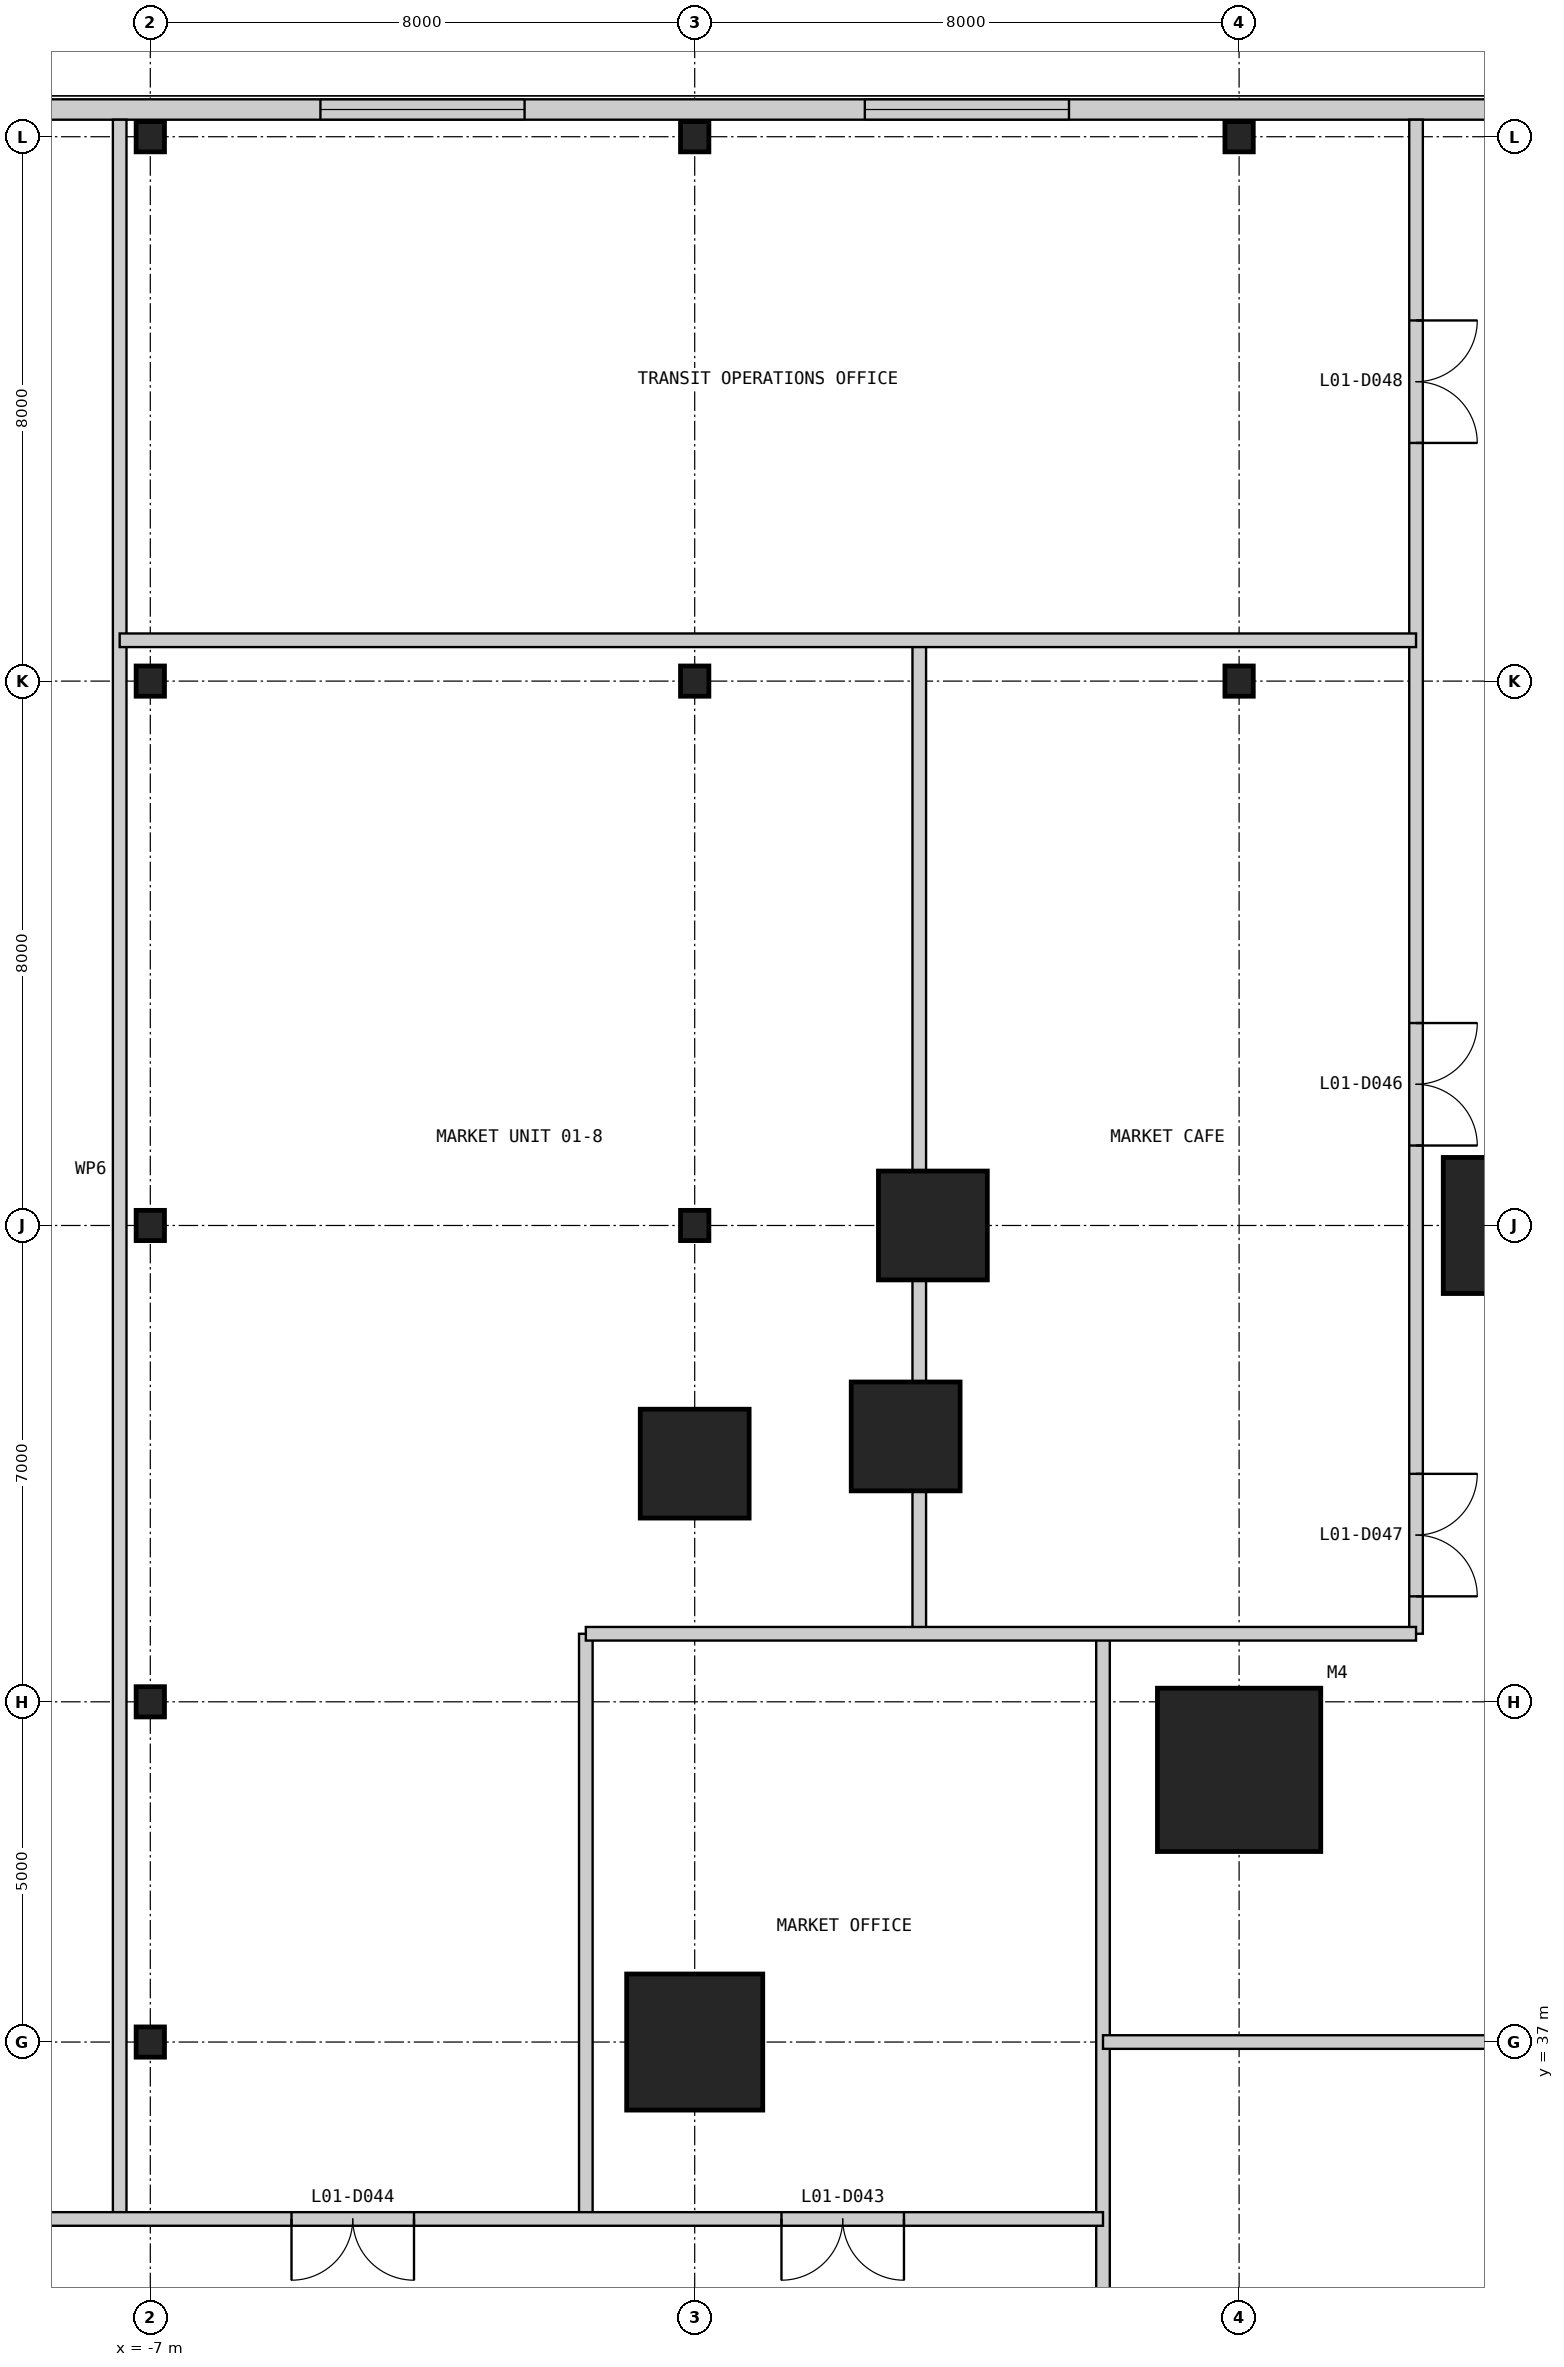
"""IFC4 building model, lengths in metres.
Left out: names, types, materials, properties, quantities, classifications, styles, units other than length and angle.
Written with IfcOpenShell. Run it as: python <this file> out.ifc"""

import sys

from ifc_helpers import new_model, si_unit, direction, frame, frame_2d, origin, origin_2d, place, context, subcontext, project, spatial, rectangle, i_section, extrude, element, fill, save


model = new_model("IFC4")
c1 = context("Model", 3, precision=1e-05, world=origin(), true_north=direction((0.0, 1.0)))
c2 = subcontext(c1, "Body", "Model", "MODEL_VIEW")
j1 = project(units=[si_unit("LENGTHUNIT", "METRE"), si_unit("PLANEANGLEUNIT", "RADIAN")], contexts=[c1])
p1 = place(None, origin())
s1 = spatial("IfcSite", under=j1, at=p1, CompositionType="ELEMENT")
p2 = place(p1, origin())
s2 = spatial("IfcBuilding", under=s1, at=p2, CompositionType="ELEMENT")
p3 = place(p2, frame((0.0, 0.0, 7.0)))
s3 = spatial("IfcBuildingStorey", under=s2, at=p3, CompositionType="ELEMENT", Elevation=7.0)
p4 = place(p3, frame((9.0, 41.0, 0.0), z_axis=(0.0, 0.0, 1.0), x_axis=(1.0, 0.0, 0.0)))
e1 = element("IfcColumn", 1, at=p4, inside=s3, PredefinedType="COLUMN", context=c2, shape_type="SweptSolid", body=[
    extrude(rectangle(XDim=2.4, YDim=2.4, at=origin_2d()), origin(), (0.0, 0.0, 1.0), 4.8),
])
p5 = place(p3, frame((13.0, 49.0, 0.0), z_axis=(0.0, 0.0, 1.0), x_axis=(1.0, 0.0, 0.0)))
e2 = element("IfcColumn", 2, at=p5, inside=s3, PredefinedType="COLUMN", context=c2, shape_type="SweptSolid", body=[
    extrude(rectangle(XDim=2.0, YDim=2.0, at=origin_2d()), origin(), (0.0, 0.0, 1.0), 4.8),
])
for number, where, z_axis, x_axis in (
    (3, (4.5, 49.0, 0.0), (0.0, 0.0, 1.0), (1.0, 0.0, 0.0)),
    (4, (4.1, 45.9, 0.0), (0.0, 0.0, 1.0), (1.0, 0.0, 0.0)),
    (5, (1.0, 45.5, 0.0), (0.0, 0.0, 1.0), (1.0, 0.0, 0.0)),
):
    element("IfcColumn", number, at=place(p3, frame(where, z_axis=z_axis, x_axis=x_axis)), inside=s3, PredefinedType="COLUMN", context=c2, shape_type="SweptSolid", body=[
        extrude(rectangle(XDim=1.6, YDim=1.6, at=origin_2d()), origin(), (0.0, 0.0, 1.0), 4.8),
    ])
p6 = place(p3, frame((1.0, 37.0, 0.0), z_axis=(0.0, 0.0, 1.0), x_axis=(1.0, 0.0, 0.0)))
e6 = element("IfcColumn", 6, at=p6, inside=s3, PredefinedType="COLUMN", context=c2, shape_type="SweptSolid", body=[
    extrude(rectangle(XDim=2.0, YDim=2.0, at=origin_2d()), origin(), (0.0, 0.0, 1.0), 4.8),
])
for number, where, z_axis, x_axis in (
    (7, (-7.0, 37.0, 0.0), (0.0, 0.0, 1.0), (1.0, 0.0, 0.0)),
    (8, (-7.0, 42.0, 0.0), (0.0, 0.0, 1.0), (1.0, 0.0, 0.0)),
    (9, (-7.0, 49.0, 0.0), (0.0, 0.0, 1.0), (1.0, 0.0, 0.0)),
    (10, (-7.0, 57.0, 0.0), (0.0, 0.0, 1.0), (1.0, 0.0, 0.0)),
    (11, (-7.0, 65.0, 0.0), (0.0, 0.0, 1.0), (1.0, 0.0, 0.0)),
    (12, (1.0, 49.0, 0.0), (0.0, 0.0, 1.0), (1.0, 0.0, 0.0)),
    (13, (1.0, 57.0, 0.0), (0.0, 0.0, 1.0), (1.0, 0.0, 0.0)),
    (14, (1.0, 65.0, 0.0), (0.0, 0.0, 1.0), (1.0, 0.0, 0.0)),
    (15, (9.0, 57.0, 0.0), (0.0, 0.0, 1.0), (1.0, 0.0, 0.0)),
    (16, (9.0, 65.0, 0.0), (0.0, 0.0, 1.0), (1.0, 0.0, 0.0)),
):
    element("IfcColumn", number, at=place(p3, frame(where, z_axis=z_axis, x_axis=x_axis)), inside=s3, PredefinedType="COLUMN", context=c2, shape_type="SweptSolid", body=[
        extrude(i_section(OverallWidth=0.417, OverallDepth=0.445, WebThickness=0.039, FlangeThickness=0.063, at=origin_2d()), origin(), (0.0, 0.0, 1.0), 4.8),
    ])
p7 = place(p3, frame((65.55, 65.4, 0.0), z_axis=(0.0, 0.0, 1.0), x_axis=(-1.0, 0.0, 0.0)))
e17 = element("IfcWall", 17, at=p7, inside=s3, PredefinedType="SOLIDWALL", context=c2, shape_type="SweptSolid", body=[
    extrude(rectangle(XDim=81.1, YDim=0.3, at=frame_2d((40.55, 0.0))), origin(), (0.0, 0.0, 1.0), 4.5),
])
p8 = place(p7, frame((75.05, 0.0, 0.9)))
e18 = element("IfcOpeningElement", 18, at=p8, cuts=e17, PredefinedType="OPENING", context=c2, shape_type="SweptSolid", body=[
    extrude(rectangle(XDim=3.0, YDim=2.4, at=frame_2d((1.5, 1.2))), frame((0.0, 0.16, 0.0), z_axis=(0.0, -1.0, 0.0), x_axis=(1.0, 0.0, 0.0)), (0.0, 0.0, 1.0), 0.32),
])
p9 = place(p7, frame((67.05, 0.0, 0.9)))
e19 = element("IfcOpeningElement", 19, at=p9, cuts=e17, PredefinedType="OPENING", context=c2, shape_type="SweptSolid", body=[
    extrude(rectangle(XDim=3.0, YDim=2.4, at=frame_2d((1.5, 1.2))), frame((0.0, 0.16, 0.0), z_axis=(0.0, -1.0, 0.0), x_axis=(1.0, 0.0, 0.0)), (0.0, 0.0, 1.0), 0.32),
])
p10 = place(p7, frame((59.05, 0.0, 0.9)))
e20 = element("IfcOpeningElement", 20, at=p10, cuts=e17, PredefinedType="OPENING", context=c2, shape_type="SweptSolid", body=[
    extrude(rectangle(XDim=3.0, YDim=2.4, at=frame_2d((1.5, 1.2))), frame((0.0, 0.16, 0.0), z_axis=(0.0, -1.0, 0.0), x_axis=(1.0, 0.0, 0.0)), (0.0, 0.0, 1.0), 0.32),
])
p11 = place(p7, frame((45.05, 0.0, 0.9)))
e21 = element("IfcOpeningElement", 21, at=p11, cuts=e17, PredefinedType="OPENING", context=c2, shape_type="SweptSolid", body=[
    extrude(rectangle(XDim=3.0, YDim=2.4, at=frame_2d((1.5, 1.2))), frame((0.0, 0.16, 0.0), z_axis=(0.0, -1.0, 0.0), x_axis=(1.0, 0.0, 0.0)), (0.0, 0.0, 1.0), 0.32),
])
p12 = place(p7, frame((33.05, 0.0, 0.9)))
e22 = element("IfcOpeningElement", 22, at=p12, cuts=e17, PredefinedType="OPENING", context=c2, shape_type="SweptSolid", body=[
    extrude(rectangle(XDim=3.0, YDim=2.4, at=frame_2d((1.5, 1.2))), frame((0.0, 0.16, 0.0), z_axis=(0.0, -1.0, 0.0), x_axis=(1.0, 0.0, 0.0)), (0.0, 0.0, 1.0), 0.32),
])
p13 = place(p7, frame((24.55, 0.0, 0.9)))
e23 = element("IfcOpeningElement", 23, at=p13, cuts=e17, PredefinedType="OPENING", context=c2, shape_type="SweptSolid", body=[
    extrude(rectangle(XDim=3.0, YDim=2.4, at=frame_2d((1.5, 1.2))), frame((0.0, 0.16, 0.0), z_axis=(0.0, -1.0, 0.0), x_axis=(1.0, 0.0, 0.0)), (0.0, 0.0, 1.0), 0.32),
])
p14 = place(p7, frame((18.55, 0.0, 0.9)))
e24 = element("IfcOpeningElement", 24, at=p14, cuts=e17, PredefinedType="OPENING", context=c2, shape_type="SweptSolid", body=[
    extrude(rectangle(XDim=3.0, YDim=2.4, at=frame_2d((1.5, 1.2))), frame((0.0, 0.16, 0.0), z_axis=(0.0, -1.0, 0.0), x_axis=(1.0, 0.0, 0.0)), (0.0, 0.0, 1.0), 0.32),
])
p15 = place(p7, frame((11.05, 0.0, 0.9)))
e25 = element("IfcOpeningElement", 25, at=p15, cuts=e17, PredefinedType="OPENING", context=c2, shape_type="SweptSolid", body=[
    extrude(rectangle(XDim=3.0, YDim=2.4, at=frame_2d((1.5, 1.2))), frame((0.0, 0.16, 0.0), z_axis=(0.0, -1.0, 0.0), x_axis=(1.0, 0.0, 0.0)), (0.0, 0.0, 1.0), 0.32),
])
p16 = place(p7, frame((3.05, 0.0, 0.9)))
e26 = element("IfcOpeningElement", 26, at=p16, cuts=e17, PredefinedType="OPENING", context=c2, shape_type="SweptSolid", body=[
    extrude(rectangle(XDim=3.0, YDim=2.4, at=frame_2d((1.5, 1.2))), frame((0.0, 0.16, 0.0), z_axis=(0.0, -1.0, 0.0), x_axis=(1.0, 0.0, 0.0)), (0.0, 0.0, 1.0), 0.32),
])
p17 = place(p3, frame((-7.45, 34.4, 0.0), z_axis=(0.0, 0.0, 1.0), x_axis=(0.0, 1.0, 0.0)))
e27 = element("IfcWall", 27, at=p17, inside=s3, PredefinedType="PARTITIONING", context=c2, shape_type="SweptSolid", body=[
    extrude(rectangle(XDim=30.85, YDim=0.2, at=frame_2d((15.425, 0.0))), origin(), (0.0, 0.0, 1.0), 4.5),
])
p18 = place(p3, frame((-0.6, 34.4, 0.0), z_axis=(0.0, 0.0, 1.0), x_axis=(0.0, 1.0, 0.0)))
e28 = element("IfcWall", 28, at=p18, inside=s3, PredefinedType="PARTITIONING", context=c2, shape_type="SweptSolid", body=[
    extrude(rectangle(XDim=8.6, YDim=0.2, at=frame_2d((4.3, 0.0))), origin(), (0.0, 0.0, 1.0), 4.5),
])
p19 = place(p3, frame((4.3, 43.0, 0.0), z_axis=(0.0, 0.0, 1.0), x_axis=(0.0, 1.0, 0.0)))
e29 = element("IfcWall", 29, at=p19, inside=s3, PredefinedType="PARTITIONING", context=c2, shape_type="SweptSolid", body=[
    extrude(rectangle(XDim=2.1, YDim=0.2, at=frame_2d((1.05, 0.0))), origin(), (0.0, 0.0, 1.0), 4.5),
])
p20 = place(p3, frame((4.3, 46.7, 0.0), z_axis=(0.0, 0.0, 1.0), x_axis=(0.0, 1.0, 0.0)))
e30 = element("IfcWall", 30, at=p20, inside=s3, PredefinedType="PARTITIONING", context=c2, shape_type="SweptSolid", body=[
    extrude(rectangle(XDim=1.5, YDim=0.2, at=frame_2d((0.75, 0.0))), origin(), (0.0, 0.0, 1.0), 3.65),
])
p21 = place(p3, frame((4.3, 49.8, 0.0), z_axis=(0.0, 0.0, 1.0), x_axis=(0.0, 1.0, 0.0)))
e31 = element("IfcWall", 31, at=p21, inside=s3, PredefinedType="PARTITIONING", context=c2, shape_type="SweptSolid", body=[
    extrude(rectangle(XDim=7.8, YDim=0.2, at=frame_2d((3.9, 0.0))), origin(), (0.0, 0.0, 1.0), 4.5),
])
p22 = place(p3, frame((7.0, 22.0, 0.0), z_axis=(0.0, 0.0, 1.0), x_axis=(0.0, 1.0, 0.0)))
e32 = element("IfcWall", 32, at=p22, inside=s3, PredefinedType="PARTITIONING", context=c2, shape_type="SweptSolid", body=[
    extrude(rectangle(XDim=21.0, YDim=0.2, at=frame_2d((10.5, 0.0))), origin(), (0.0, 0.0, 1.0), 3.843),
])
p23 = place(p3, frame((11.6, 43.0, 0.0), z_axis=(0.0, 0.0, 1.0), x_axis=(0.0, 1.0, 0.0)))
e33 = element("IfcWall", 33, at=p23, inside=s3, PredefinedType="PARTITIONING", context=c2, shape_type="SweptSolid", body=[
    extrude(rectangle(XDim=22.25, YDim=0.2, at=frame_2d((11.125, 0.0))), origin(), (0.0, 0.0, 1.0), 4.5),
])
p24 = place(p23, frame((7.175, 0.0, 0.0)))
e34 = element("IfcOpeningElement", 34, at=p24, cuts=e33, PredefinedType="OPENING", context=c2, shape_type="SweptSolid", body=[
    extrude(rectangle(XDim=1.8, YDim=2.4, at=frame_2d((0.9, 1.2))), frame((0.0, 0.11, 0.0), z_axis=(0.0, -1.0, 0.0), x_axis=(1.0, 0.0, 0.0)), (0.0, 0.0, 1.0), 0.22),
])
p25 = place(p23, frame((0.55, 0.0, 0.0)))
e35 = element("IfcOpeningElement", 35, at=p25, cuts=e33, PredefinedType="OPENING", context=c2, shape_type="SweptSolid", body=[
    extrude(rectangle(XDim=1.8, YDim=2.4, at=frame_2d((0.9, 1.2))), frame((0.0, 0.11, 0.0), z_axis=(0.0, -1.0, 0.0), x_axis=(1.0, 0.0, 0.0)), (0.0, 0.0, 1.0), 0.22),
])
p26 = place(p23, frame((17.5, 0.0, 0.0)))
e36 = element("IfcOpeningElement", 36, at=p26, cuts=e33, PredefinedType="OPENING", context=c2, shape_type="SweptSolid", body=[
    extrude(rectangle(XDim=1.8, YDim=2.4, at=frame_2d((0.9, 1.2))), frame((0.0, 0.11, 0.0), z_axis=(0.0, -1.0, 0.0), x_axis=(1.0, 0.0, 0.0)), (0.0, 0.0, 1.0), 0.22),
])
p27 = place(p3, frame((-15.25, 34.4, 0.0), z_axis=(0.0, 0.0, 1.0), x_axis=(1.0, 0.0, 0.0)))
e37 = element("IfcWall", 37, at=p27, inside=s3, PredefinedType="PARTITIONING", context=c2, shape_type="SweptSolid", body=[
    extrude(rectangle(XDim=22.25, YDim=0.2, at=frame_2d((11.125, 0.0))), origin(), (0.0, 0.0, 1.0), 4.5),
])
p28 = place(p27, frame((17.525, 0.0, 0.0)))
e38 = element("IfcOpeningElement", 38, at=p28, cuts=e37, PredefinedType="OPENING", context=c2, shape_type="SweptSolid", body=[
    extrude(rectangle(XDim=1.8, YDim=2.4, at=frame_2d((0.9, 1.2))), frame((0.0, 0.11, 0.0), z_axis=(0.0, -1.0, 0.0), x_axis=(1.0, 0.0, 0.0)), (0.0, 0.0, 1.0), 0.22),
])
p29 = place(p27, frame((10.325, 0.0, 0.0)))
e39 = element("IfcOpeningElement", 39, at=p29, cuts=e37, PredefinedType="OPENING", context=c2, shape_type="SweptSolid", body=[
    extrude(rectangle(XDim=1.8, YDim=2.4, at=frame_2d((0.9, 1.2))), frame((0.0, 0.11, 0.0), z_axis=(0.0, -1.0, 0.0), x_axis=(1.0, 0.0, 0.0)), (0.0, 0.0, 1.0), 0.22),
])
p30 = place(p27, frame((3.025, 0.0, 0.0)))
e40 = element("IfcOpeningElement", 40, at=p30, cuts=e37, PredefinedType="OPENING", context=c2, shape_type="SweptSolid", body=[
    extrude(rectangle(XDim=1.8, YDim=2.4, at=frame_2d((0.9, 1.2))), frame((0.0, 0.11, 0.0), z_axis=(0.0, -1.0, 0.0), x_axis=(1.0, 0.0, 0.0)), (0.0, 0.0, 1.0), 0.22),
])
p31 = place(p3, frame((7.0, 37.0, 0.0), z_axis=(0.0, 0.0, 1.0), x_axis=(1.0, 0.0, 0.0)))
e41 = element("IfcWall", 41, at=p31, inside=s3, PredefinedType="PARTITIONING", context=c2, shape_type="SweptSolid", body=[
    extrude(rectangle(XDim=6.0, YDim=0.2, at=frame_2d((3.0, 0.0))), origin(), (0.0, 0.0, 1.0), 3.653),
])
p32 = place(p3, frame((-0.6, 43.0, 0.0), z_axis=(0.0, 0.0, 1.0), x_axis=(1.0, 0.0, 0.0)))
e42 = element("IfcWall", 42, at=p32, inside=s3, PredefinedType="PARTITIONING", context=c2, shape_type="SweptSolid", body=[
    extrude(rectangle(XDim=12.2, YDim=0.2, at=frame_2d((6.1, 0.0))), origin(), (0.0, 0.0, 1.0), 4.5),
])
p33 = place(p3, frame((-7.45, 57.6, 0.0), z_axis=(0.0, 0.0, 1.0), x_axis=(1.0, 0.0, 0.0)))
e43 = element("IfcWall", 43, at=p33, inside=s3, PredefinedType="PARTITIONING", context=c2, shape_type="SweptSolid", body=[
    extrude(rectangle(XDim=19.05, YDim=0.2, at=frame_2d((9.525, 0.0))), origin(), (0.0, 0.0, 1.0), 4.5),
])
p34 = place(p9, origin())
e44 = element("IfcWindow", 44, at=p34, inside=s3, PartitioningType="SINGLE_PANEL", PredefinedType="WINDOW", context=c2, shape_type="SweptSolid", body=[
    extrude(rectangle(XDim=3.0, YDim=2.4, at=frame_2d((1.5, 1.2))), frame((0.0, 0.03, 0.0), z_axis=(0.0, -1.0, 0.0), x_axis=(1.0, 0.0, 0.0)), (0.0, 0.0, 1.0), 0.06),
])
fill(e19, e44)
p35 = place(p10, origin())
e45 = element("IfcWindow", 45, at=p35, inside=s3, PartitioningType="SINGLE_PANEL", PredefinedType="WINDOW", context=c2, shape_type="SweptSolid", body=[
    extrude(rectangle(XDim=3.0, YDim=2.4, at=frame_2d((1.5, 1.2))), frame((0.0, 0.03, 0.0), z_axis=(0.0, -1.0, 0.0), x_axis=(1.0, 0.0, 0.0)), (0.0, 0.0, 1.0), 0.06),
])
fill(e20, e45)
p36 = place(p28, frame((1.8, 0.0, 0.0), z_axis=(0.0, 0.0, 1.0), x_axis=(-1.0, 0.0, 0.0)))
e46 = element("IfcDoor", 46, at=p36, inside=s3, OperationType="DOUBLE_DOOR_SINGLE_SWING", PredefinedType="DOOR", context=c2, shape_type="SweptSolid", body=[
    extrude(rectangle(XDim=1.8, YDim=2.4, at=frame_2d((0.9, 1.2))), frame((0.0, 0.025, 0.0), z_axis=(0.0, -1.0, 0.0), x_axis=(1.0, 0.0, 0.0)), (0.0, 0.0, 1.0), 0.05),
])
fill(e38, e46)
p37 = place(p29, frame((1.8, 0.0, 0.0), z_axis=(0.0, 0.0, 1.0), x_axis=(-1.0, 0.0, 0.0)))
e47 = element("IfcDoor", 47, at=p37, inside=s3, OperationType="DOUBLE_DOOR_SINGLE_SWING", PredefinedType="DOOR", context=c2, shape_type="SweptSolid", body=[
    extrude(rectangle(XDim=1.8, YDim=2.4, at=frame_2d((0.9, 1.2))), frame((0.0, 0.025, 0.0), z_axis=(0.0, -1.0, 0.0), x_axis=(1.0, 0.0, 0.0)), (0.0, 0.0, 1.0), 0.05),
])
fill(e39, e47)
p38 = place(p24, frame((1.8, 0.0, 0.0), z_axis=(0.0, 0.0, 1.0), x_axis=(-1.0, 0.0, 0.0)))
e48 = element("IfcDoor", 48, at=p38, inside=s3, OperationType="DOUBLE_DOOR_SINGLE_SWING", PredefinedType="DOOR", context=c2, shape_type="SweptSolid", body=[
    extrude(rectangle(XDim=1.8, YDim=2.4, at=frame_2d((0.9, 1.2))), frame((0.0, 0.025, 0.0), z_axis=(0.0, -1.0, 0.0), x_axis=(1.0, 0.0, 0.0)), (0.0, 0.0, 1.0), 0.05),
])
fill(e34, e48)
p39 = place(p25, frame((1.8, 0.0, 0.0), z_axis=(0.0, 0.0, 1.0), x_axis=(-1.0, 0.0, 0.0)))
e49 = element("IfcDoor", 49, at=p39, inside=s3, OperationType="DOUBLE_DOOR_SINGLE_SWING", PredefinedType="DOOR", context=c2, shape_type="SweptSolid", body=[
    extrude(rectangle(XDim=1.8, YDim=2.4, at=frame_2d((0.9, 1.2))), frame((0.0, 0.025, 0.0), z_axis=(0.0, -1.0, 0.0), x_axis=(1.0, 0.0, 0.0)), (0.0, 0.0, 1.0), 0.05),
])
fill(e35, e49)
p40 = place(p26, frame((1.8, 0.0, 0.0), z_axis=(0.0, 0.0, 1.0), x_axis=(-1.0, 0.0, 0.0)))
e50 = element("IfcDoor", 50, at=p40, inside=s3, OperationType="DOUBLE_DOOR_SINGLE_SWING", PredefinedType="DOOR", context=c2, shape_type="SweptSolid", body=[
    extrude(rectangle(XDim=1.8, YDim=2.4, at=frame_2d((0.9, 1.2))), frame((0.0, 0.025, 0.0), z_axis=(0.0, -1.0, 0.0), x_axis=(1.0, 0.0, 0.0)), (0.0, 0.0, 1.0), 0.05),
])
fill(e36, e50)
save(model, sys.argv[1])
